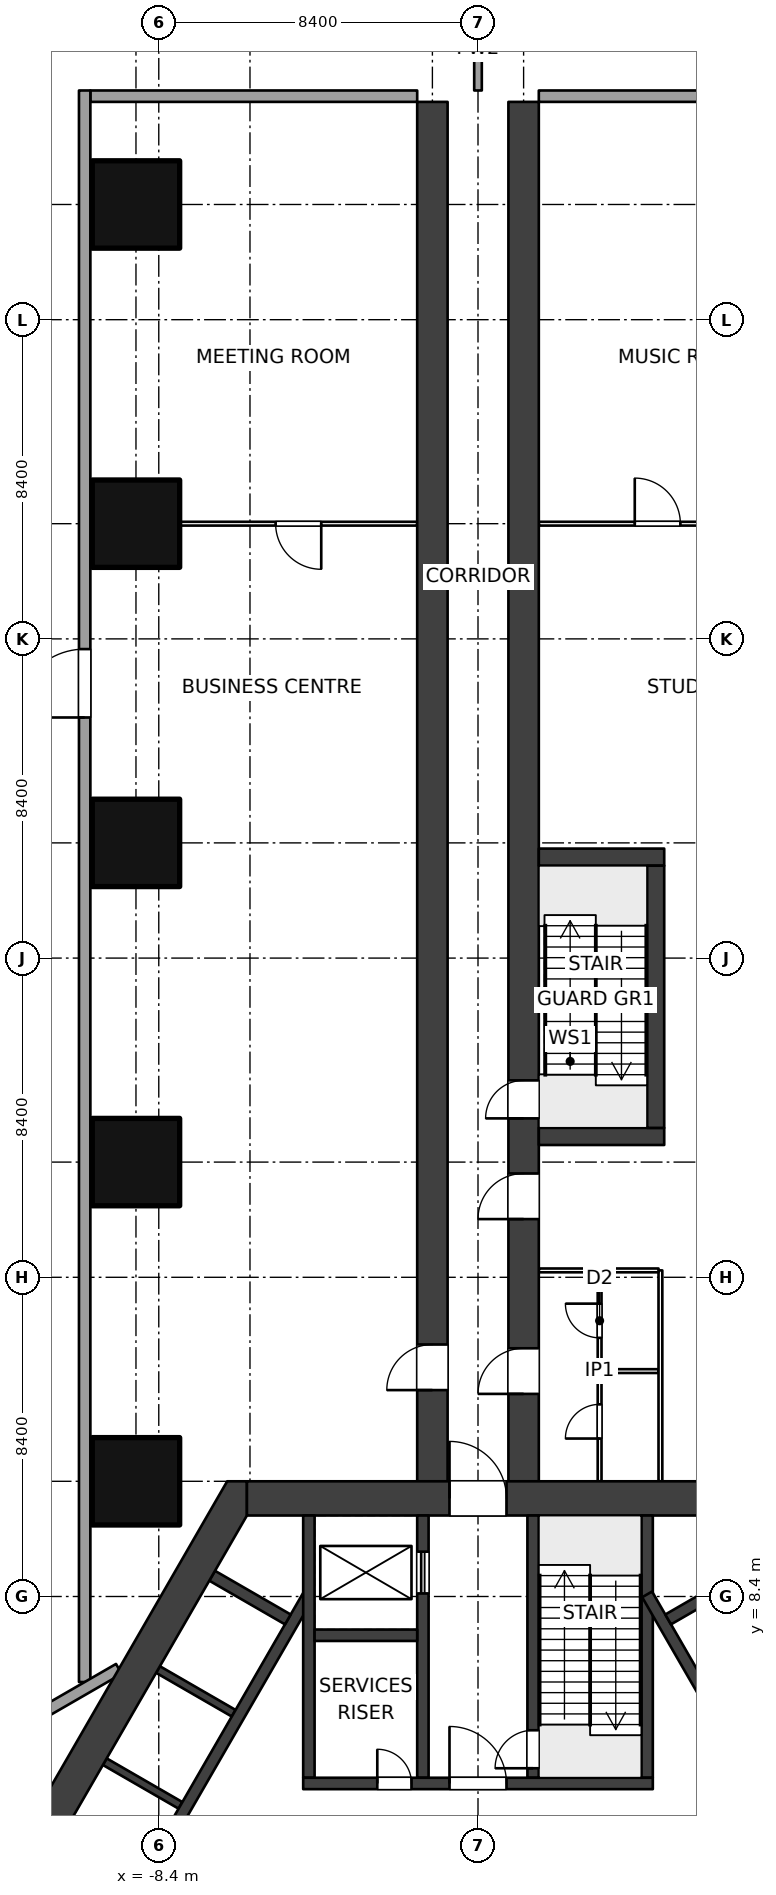
"""IFC4 building model, lengths in metres.
Left out: names, types, materials, properties, quantities, classifications, styles, units other than length and angle.
Written with IfcOpenShell. Run it as: python <this file> out.ifc"""

import sys

from ifc_helpers import new_model, si_unit, direction, frame, frame_2d, origin, origin_2d, place, context, subcontext, project, spatial, polyline, rectangle, outline, extrude, element, fill, save


model = new_model("IFC4")
c1 = context("Model", 3, precision=1e-05, world=origin(), true_north=direction((0.0, 1.0)))
c2 = subcontext(c1, "Body", "Model", "MODEL_VIEW")
j1 = project(units=[si_unit("LENGTHUNIT", "METRE"), si_unit("PLANEANGLEUNIT", "RADIAN")], contexts=[c1])
p1 = place(None, origin())
s1 = spatial("IfcSite", under=j1, at=p1, CompositionType="ELEMENT")
p2 = place(p1, origin())
s2 = spatial("IfcBuilding", under=s1, at=p2, CompositionType="ELEMENT")
p3 = place(p2, frame((0.0, 0.0, 16.0)))
s3 = spatial("IfcBuildingStorey", under=s2, at=p3, CompositionType="ELEMENT", Elevation=16.0)
for number, where, z_axis, x_axis in (
    (1, (-9.0, 11.432, 0.0), (0.0, 0.0, 1.0), (1.0, 0.0, 0.0)),
    (2, (-9.0, 19.832, 0.0), (0.0, 0.0, 1.0), (1.0, 0.0, 0.0)),
    (3, (-9.0, 28.231, 0.0), (0.0, 0.0, 1.0), (1.0, 0.0, 0.0)),
    (4, (-9.0, 36.632, 0.0), (0.0, 0.0, 1.0), (1.0, 0.0, 0.0)),
    (5, (-9.0, 45.031, 0.0), (0.0, 0.0, 1.0), (1.0, 0.0, 0.0)),
):
    element("IfcColumn", number, at=place(p3, frame(where, z_axis=z_axis, x_axis=x_axis)), inside=s3, PredefinedType="COLUMN", context=c2, shape_type="SweptSolid", body=[
        extrude(rectangle(XDim=2.3, YDim=2.3, at=origin_2d()), origin(), (0.0, 0.0, 1.0), 5.0),
    ])
p4 = place(p3, frame((-6.08, 10.981, 0.0), z_axis=(0.0, 0.0, 1.0), x_axis=(1.0, 0.0, 0.0)))
e6 = element("IfcWall", 6, at=p4, inside=s3, PredefinedType="SHEAR", context=c2, shape_type="SweptSolid", body=[
    extrude(rectangle(XDim=12.161, YDim=0.9, at=frame_2d((6.08, 0.0))), origin(), (0.0, 0.0, 1.0), 5.0),
])
p5 = place(p4, frame((5.33, 0.0, 0.0)))
e7 = element("IfcOpeningElement", 7, at=p5, cuts=e6, PredefinedType="OPENING", context=c2, shape_type="SweptSolid", body=[
    extrude(rectangle(XDim=1.5, YDim=2.1, at=frame_2d((0.75, 1.05))), frame((0.0, 0.46, 0.0), z_axis=(0.0, -1.0, 0.0), x_axis=(1.0, 0.0, 0.0)), (0.0, 0.0, 1.0), 0.92),
])
p6 = place(p3, origin())
e8 = element("IfcWall", 8, at=p6, inside=s3, PredefinedType="SHEAR", context=c2, shape_type="SweptSolid", body=[
    extrude(outline(polyline([(-6.6, 11.432), (-13.2, 0.0), (-12.94, -0.45), (-12.161, 0.0), (-6.08, 10.531), (-6.08, 11.432), (-6.6, 11.432)])), origin(), (0.0, 0.0, 1.0), 5.0),
])
p7 = place(p3, frame((-4.6, 3.48, 0.0), z_axis=(0.0, 0.0, 1.0), x_axis=(1.0, 0.0, 0.0)))
e9 = element("IfcWall", 9, at=p7, inside=s3, PredefinedType="SHEAR", context=c2, shape_type="SweptSolid", body=[
    extrude(rectangle(XDim=9.2, YDim=0.3, at=frame_2d((4.6, 0.0))), origin(), (0.0, 0.0, 1.0), 5.0),
])
p8 = place(p7, frame((3.85, 0.0, 0.0)))
e10 = element("IfcOpeningElement", 10, at=p8, cuts=e9, PredefinedType="OPENING", context=c2, shape_type="SweptSolid", body=[
    extrude(rectangle(XDim=1.5, YDim=2.1, at=frame_2d((0.75, 1.05))), frame((0.0, 0.16, 0.0), z_axis=(0.0, -1.0, 0.0), x_axis=(1.0, 0.0, 0.0)), (0.0, 0.0, 1.0), 0.32),
])
p9 = place(p7, frame((1.95, 0.0, 0.0)))
e11 = element("IfcOpeningElement", 11, at=p9, cuts=e9, PredefinedType="OPENING", context=c2, shape_type="SweptSolid", body=[
    extrude(rectangle(XDim=0.9, YDim=2.1, at=frame_2d((0.45, 1.05))), frame((0.0, 0.16, 0.0), z_axis=(0.0, -1.0, 0.0), x_axis=(1.0, 0.0, 0.0)), (0.0, 0.0, 1.0), 0.32),
])
p10 = place(p3, frame((1.45, 3.63, 0.0), z_axis=(0.0, 0.0, 1.0), x_axis=(0.0, 1.0, 0.0)))
e12 = element("IfcWall", 12, at=p10, inside=s3, PredefinedType="SHEAR", context=c2, shape_type="SweptSolid", body=[
    extrude(rectangle(XDim=6.902, YDim=0.3, at=frame_2d((3.451, 0.0))), origin(), (0.0, 0.0, 1.0), 5.0),
])
p11 = place(p10, frame((0.25, 0.0, 0.0)))
e13 = element("IfcOpeningElement", 13, at=p11, cuts=e12, PredefinedType="OPENING", context=c2, shape_type="SweptSolid", body=[
    extrude(rectangle(XDim=1.0, YDim=2.1, at=frame_2d((0.5, 1.05))), frame((0.0, 0.16, 0.0), z_axis=(0.0, -1.0, 0.0), x_axis=(1.0, 0.0, 0.0)), (0.0, 0.0, 1.0), 0.32),
])
p12 = place(p3, frame((4.45, 3.63, 0.0), z_axis=(0.0, 0.0, 1.0), x_axis=(0.0, 1.0, 0.0)))
e14 = element("IfcWall", 14, at=p12, inside=s3, PredefinedType="SHEAR", context=c2, shape_type="SweptSolid", body=[
    extrude(rectangle(XDim=6.902, YDim=0.3, at=frame_2d((3.451, 0.0))), origin(), (0.0, 0.0, 1.0), 5.0),
])
p13 = place(p3, frame((-1.45, 3.63, 0.0), z_axis=(0.0, 0.0, 1.0), x_axis=(0.0, 1.0, 0.0)))
e15 = element("IfcWall", 15, at=p13, inside=s3, PredefinedType="SHEAR", context=c2, shape_type="SweptSolid", body=[
    extrude(rectangle(XDim=6.902, YDim=0.3, at=frame_2d((3.451, 0.0))), origin(), (0.0, 0.0, 1.0), 5.0),
])
p14 = place(p13, frame((4.85, 0.0, 0.0)))
e16 = element("IfcOpeningElement", 16, at=p14, cuts=e15, PredefinedType="OPENING", context=c2, shape_type="SweptSolid", body=[
    extrude(rectangle(XDim=1.1, YDim=2.1, at=frame_2d((0.55, 1.05))), frame((0.0, 0.16, 0.0), z_axis=(0.0, -1.0, 0.0), x_axis=(1.0, 0.0, 0.0)), (0.0, 0.0, 1.0), 0.32),
])
p15 = place(p3, frame((-4.45, 3.63, 0.0), z_axis=(0.0, 0.0, 1.0), x_axis=(0.0, 1.0, 0.0)))
e17 = element("IfcWall", 17, at=p15, inside=s3, PredefinedType="SHEAR", context=c2, shape_type="SweptSolid", body=[
    extrude(rectangle(XDim=6.902, YDim=0.3, at=frame_2d((3.451, 0.0))), origin(), (0.0, 0.0, 1.0), 5.0),
])
p16 = place(p3, frame((-4.3, 7.38, 0.0), z_axis=(0.0, 0.0, 1.0), x_axis=(1.0, 0.0, 0.0)))
e18 = element("IfcWall", 18, at=p16, inside=s3, PredefinedType="SHEAR", context=c2, shape_type="SweptSolid", body=[
    extrude(rectangle(XDim=2.7, YDim=0.3, at=frame_2d((1.35, 0.0))), origin(), (0.0, 0.0, 1.0), 5.0),
])
p17 = place(p3, frame((4.45, 8.455, 0.0), z_axis=(0.0, 0.0, 1.0), x_axis=(0.500002290144, -0.866024081565, 0.0)))
e19 = element("IfcWall", 19, at=p17, inside=s3, PredefinedType="SHEAR", context=c2, shape_type="SweptSolid", body=[
    extrude(rectangle(XDim=10.195, YDim=0.3, at=frame_2d((5.098, 0.0))), origin(), (0.0, 0.0, 1.0), 5.0),
])
p18 = place(p3, frame((5.004, 7.796, 0.0), z_axis=(0.0, 0.0, 1.0), x_axis=(0.866053019151, 0.499952165731, 0.0)))
e20 = element("IfcWall", 20, at=p18, inside=s3, PredefinedType="SHEAR", context=c2, shape_type="SweptSolid", body=[
    extrude(rectangle(XDim=2.3, YDim=0.3, at=frame_2d((1.15, 0.0))), origin(), (0.0, 0.0, 1.0), 5.0),
])
p19 = place(p3, frame((-9.548, -0.374, 0.0), z_axis=(0.0, 0.0, 1.0), x_axis=(0.500002290144, 0.866024081565, 0.0)))
e21 = element("IfcWall", 21, at=p19, inside=s3, PredefinedType="SHEAR", context=c2, shape_type="SweptSolid", body=[
    extrude(rectangle(XDim=10.195, YDim=0.3, at=frame_2d((5.098, 0.0))), origin(), (0.0, 0.0, 1.0), 5.0),
])
p20 = place(p3, frame((-5.004, 7.796, 0.0), z_axis=(0.0, 0.0, 1.0), x_axis=(-0.866053019151, 0.499952165731, 0.0)))
e22 = element("IfcWall", 22, at=p20, inside=s3, PredefinedType="SHEAR", context=c2, shape_type="SweptSolid", body=[
    extrude(rectangle(XDim=2.3, YDim=0.3, at=frame_2d((1.15, 0.0))), origin(), (0.0, 0.0, 1.0), 5.0),
])
for number, where, z_axis, x_axis in (
    (23, (-7.829, 2.903, 0.0), (0.0, 0.0, 1.0), (-0.866, 0.5, 0.0)),
    (24, (-6.429, 5.328, 0.0), (0.0, 0.0, 1.0), (-0.866, 0.5, 0.0)),
):
    element("IfcWall", number, at=place(p3, frame(where, z_axis=z_axis, x_axis=x_axis)), inside=s3, PredefinedType="SHEAR", context=c2, shape_type="SweptSolid", body=[
        extrude(rectangle(XDim=2.3, YDim=0.2, at=frame_2d((1.15, 0.0))), origin(), (0.0, 0.0, 1.0), 5.0),
    ])
p21 = place(p3, frame((-1.2, 10.981, 0.0), z_axis=(0.0, 0.0, 1.0), x_axis=(0.0, 1.0, 0.0)))
e25 = element("IfcWall", 25, at=p21, inside=s3, PredefinedType="SHEAR", context=c2, shape_type="SweptSolid", body=[
    extrude(rectangle(XDim=36.75, YDim=0.8, at=frame_2d((18.375, 0.0))), origin(), (0.0, 0.0, 1.0), 5.0),
])
p22 = place(p21, frame((2.85, 0.0, 0.0)))
e26 = element("IfcOpeningElement", 26, at=p22, cuts=e25, PredefinedType="OPENING", context=c2, shape_type="SweptSolid", body=[
    extrude(rectangle(XDim=1.2, YDim=2.1, at=frame_2d((0.6, 1.05))), frame((0.0, 0.41, 0.0), z_axis=(0.0, -1.0, 0.0), x_axis=(1.0, 0.0, 0.0)), (0.0, 0.0, 1.0), 0.82),
])
p23 = place(p3, frame((1.2, 10.981, 0.0), z_axis=(0.0, 0.0, 1.0), x_axis=(0.0, 1.0, 0.0)))
e27 = element("IfcWall", 27, at=p23, inside=s3, PredefinedType="SHEAR", context=c2, shape_type="SweptSolid", body=[
    extrude(rectangle(XDim=36.75, YDim=0.8, at=frame_2d((18.375, 0.0))), origin(), (0.0, 0.0, 1.0), 5.0),
])
p24 = place(p23, frame((10.0, 0.0, 0.0)))
e28 = element("IfcOpeningElement", 28, at=p24, cuts=e27, PredefinedType="OPENING", context=c2, shape_type="SweptSolid", body=[
    extrude(rectangle(XDim=1.0, YDim=2.1, at=frame_2d((0.5, 1.05))), frame((0.0, 0.41, 0.0), z_axis=(0.0, -1.0, 0.0), x_axis=(1.0, 0.0, 0.0)), (0.0, 0.0, 1.0), 0.82),
])
p25 = place(p23, frame((2.75, 0.0, 0.0)))
e29 = element("IfcOpeningElement", 29, at=p25, cuts=e27, PredefinedType="OPENING", context=c2, shape_type="SweptSolid", body=[
    extrude(rectangle(XDim=1.2, YDim=2.1, at=frame_2d((0.6, 1.05))), frame((0.0, 0.41, 0.0), z_axis=(0.0, -1.0, 0.0), x_axis=(1.0, 0.0, 0.0)), (0.0, 0.0, 1.0), 0.82),
])
p26 = place(p23, frame((7.35, 0.0, 0.0)))
e30 = element("IfcOpeningElement", 30, at=p26, cuts=e27, PredefinedType="OPENING", context=c2, shape_type="SweptSolid", body=[
    extrude(rectangle(XDim=1.2, YDim=2.1, at=frame_2d((0.6, 1.05))), frame((0.0, 0.41, 0.0), z_axis=(0.0, -1.0, 0.0), x_axis=(1.0, 0.0, 0.0)), (0.0, 0.0, 1.0), 0.82),
])
p27 = place(p3, frame((-1.6, 36.632, 0.0), z_axis=(0.0, 0.0, 1.0), x_axis=(-1.0, 0.0, 0.0)))
e31 = element("IfcWall", 31, at=p27, inside=s3, PredefinedType="PARTITIONING", context=c2, shape_type="SweptSolid", body=[
    extrude(rectangle(XDim=6.25, YDim=0.1, at=frame_2d((3.125, 0.0))), origin(), (0.0, 0.0, 1.0), 2.9),
])
p28 = place(p27, frame((2.525, 0.0, 0.0)))
e32 = element("IfcOpeningElement", 32, at=p28, cuts=e31, PredefinedType="OPENING", context=c2, shape_type="SweptSolid", body=[
    extrude(rectangle(XDim=1.2, YDim=2.1, at=frame_2d((0.6, 1.05))), frame((0.0, 0.06, 0.0), z_axis=(0.0, -1.0, 0.0), x_axis=(1.0, 0.0, 0.0)), (0.0, 0.0, 1.0), 0.12),
])
p29 = place(p3, frame((3.2, 11.432, 0.0), z_axis=(0.0, 0.0, 1.0), x_axis=(0.0, 1.0, 0.0)))
e33 = element("IfcWall", 33, at=p29, inside=s3, PredefinedType="PARTITIONING", context=c2, shape_type="SweptSolid", body=[
    extrude(rectangle(XDim=5.6, YDim=0.1, at=frame_2d((2.8, 0.0))), origin(), (0.0, 0.0, 1.0), 4.7),
])
p30 = place(p29, frame((1.125, 0.0, 0.0)))
e34 = element("IfcOpeningElement", 34, at=p30, cuts=e33, PredefinedType="OPENING", context=c2, shape_type="SweptSolid", body=[
    extrude(rectangle(XDim=0.9, YDim=2.1, at=frame_2d((0.45, 1.05))), frame((0.0, 0.06, 0.0), z_axis=(0.0, -1.0, 0.0), x_axis=(1.0, 0.0, 0.0)), (0.0, 0.0, 1.0), 0.12),
])
p31 = place(p29, frame((3.775, 0.0, 0.0)))
e35 = element("IfcOpeningElement", 35, at=p31, cuts=e33, PredefinedType="OPENING", context=c2, shape_type="SweptSolid", body=[
    extrude(rectangle(XDim=0.9, YDim=2.1, at=frame_2d((0.45, 1.05))), frame((0.0, 0.06, 0.0), z_axis=(0.0, -1.0, 0.0), x_axis=(1.0, 0.0, 0.0)), (0.0, 0.0, 1.0), 0.12),
])
p32 = place(p3, frame((3.25, 14.332, 0.0), z_axis=(0.0, 0.0, 1.0), x_axis=(1.0, 0.0, 0.0)))
e36 = element("IfcWall", 36, at=p32, inside=s3, PredefinedType="PARTITIONING", context=c2, shape_type="SweptSolid", body=[
    extrude(rectangle(XDim=1.5, YDim=0.1, at=frame_2d((0.75, 0.0))), origin(), (0.0, 0.0, 1.0), 4.7),
])
p33 = place(p3, frame((4.8, 11.432, 0.0), z_axis=(0.0, 0.0, 1.0), x_axis=(0.0, 1.0, 0.0)))
e37 = element("IfcWall", 37, at=p33, inside=s3, PredefinedType="PARTITIONING", context=c2, shape_type="SweptSolid", body=[
    extrude(rectangle(XDim=5.55, YDim=0.1, at=frame_2d((2.775, 0.0))), origin(), (0.0, 0.0, 1.0), 4.7),
])
p34 = place(p3, frame((1.6, 16.981, 0.0), z_axis=(0.0, 0.0, 1.0), x_axis=(1.0, 0.0, 0.0)))
e38 = element("IfcWall", 38, at=p34, inside=s3, PredefinedType="PARTITIONING", context=c2, shape_type="SweptSolid", body=[
    extrude(rectangle(XDim=3.15, YDim=0.1, at=frame_2d((1.575, 0.0))), origin(), (0.0, 0.0, 1.0), 4.7),
])
p35 = place(p3, frame((1.6, 36.632, 0.0), z_axis=(0.0, 0.0, 1.0), x_axis=(1.0, 0.0, 0.0)))
e39 = element("IfcWall", 39, at=p35, inside=s3, PredefinedType="PARTITIONING", context=c2, shape_type="SweptSolid", body=[
    extrude(rectangle(XDim=6.25, YDim=0.1, at=frame_2d((3.125, 0.0))), origin(), (0.0, 0.0, 1.0), 2.9),
])
p36 = place(p35, frame((2.525, 0.0, 0.0)))
e40 = element("IfcOpeningElement", 40, at=p36, cuts=e39, PredefinedType="OPENING", context=c2, shape_type="SweptSolid", body=[
    extrude(rectangle(XDim=1.2, YDim=2.1, at=frame_2d((0.6, 1.05))), frame((0.0, 0.06, 0.0), z_axis=(0.0, -1.0, 0.0), x_axis=(1.0, 0.0, 0.0)), (0.0, 0.0, 1.0), 0.12),
])
p37 = place(p3, frame((0.0, 48.031, 0.0), z_axis=(0.0, 0.0, 1.0), x_axis=(0.0, 1.0, 0.0)))
e41 = element("IfcWall", 41, at=p37, inside=s3, PredefinedType="SOLIDWALL", context=c2, shape_type="SweptSolid", body=[
    extrude(rectangle(XDim=2.176, YDim=0.2, at=frame_2d((1.088, 0.0))), origin(), (0.0, 0.0, 1.0), 4.7),
])
for number, where, z_axis, x_axis in (
    (42, (-1.6, 47.882, 0.0), (0.0, 0.0, 1.0), (-1.0, 0.0, 0.0)),
    (43, (1.6, 47.882, 0.0), (0.0, 0.0, 1.0), (1.0, 0.0, 0.0)),
):
    element("IfcWall", number, at=place(p3, frame(where, z_axis=z_axis, x_axis=x_axis)), inside=s3, PredefinedType="SOLIDWALL", context=c2, shape_type="SweptSolid", body=[
        extrude(rectangle(XDim=8.6, YDim=0.3, at=frame_2d((4.3, 0.0))), origin(), (0.0, 0.0, 1.0), 3.1),
    ])
p38 = place(p3, frame((-10.35, 6.149, 0.0), z_axis=(0.0, 0.0, 1.0), x_axis=(0.0, 1.0, 0.0)))
e44 = element("IfcWall", 44, at=p38, inside=s3, PredefinedType="SOLIDWALL", context=c2, shape_type="SweptSolid", body=[
    extrude(rectangle(XDim=41.883, YDim=0.3, at=frame_2d((20.941, 0.0))), origin(), (0.0, 0.0, 1.0), 4.7),
])
p39 = place(p38, frame((25.383, 0.0, 0.0)))
e45 = element("IfcOpeningElement", 45, at=p39, cuts=e44, PredefinedType="OPENING", context=c2, shape_type="SweptSolid", body=[
    extrude(rectangle(XDim=1.8, YDim=2.4, at=frame_2d((0.9, 1.2))), frame((0.0, 0.16, 0.0), z_axis=(0.0, -1.0, 0.0), x_axis=(1.0, 0.0, 0.0)), (0.0, 0.0, 1.0), 0.32),
])
p40 = place(p3, frame((-9.45, 6.495, 0.0), z_axis=(0.0, 0.0, 1.0), x_axis=(-0.866025301493, -0.500000177174, 0.0)))
e46 = element("IfcWall", 46, at=p40, inside=s3, PredefinedType="SOLIDWALL", context=c2, shape_type="SweptSolid", body=[
    extrude(rectangle(XDim=43.095, YDim=0.3, at=frame_2d((21.548, 0.0))), origin(), (0.0, 0.0, 1.0), 4.7),
])
p41 = place(p40, frame((26.595, 0.0, 0.0)))
e47 = element("IfcOpeningElement", 47, at=p41, cuts=e46, PredefinedType="OPENING", context=c2, shape_type="SweptSolid", body=[
    extrude(rectangle(XDim=1.8, YDim=2.4, at=frame_2d((0.9, 1.2))), frame((0.0, 0.16, 0.0), z_axis=(0.0, -1.0, 0.0), x_axis=(1.0, 0.0, 0.0)), (0.0, 0.0, 1.0), 0.32),
])
for number, where, z_axis, x_axis in (
    (48, (1.6, 20.507, 0.0), (0.0, 0.0, 1.0), (1.0, 0.0, 0.0)),
    (49, (1.6, 27.856, 0.0), (0.0, 0.0, 1.0), (1.0, 0.0, 0.0)),
):
    element("IfcWall", number, at=place(p3, frame(where, z_axis=z_axis, x_axis=x_axis)), inside=s3, PredefinedType="SOLIDWALL", context=c2, shape_type="SweptSolid", body=[
        extrude(rectangle(XDim=3.3, YDim=0.45, at=frame_2d((1.65, 0.0))), origin(), (0.0, 0.0, 1.0), 5.0),
    ])
p42 = place(p3, frame((4.675, 20.731, 0.0), z_axis=(0.0, 0.0, 1.0), x_axis=(0.0, 1.0, 0.0)))
e50 = element("IfcWall", 50, at=p42, inside=s3, PredefinedType="SOLIDWALL", context=c2, shape_type="SweptSolid", body=[
    extrude(rectangle(XDim=6.9, YDim=0.45, at=frame_2d((3.45, 0.0))), origin(), (0.0, 0.0, 1.0), 5.0),
])
p43 = place(p14, origin())
e51 = element("IfcDoor", 51, at=p43, inside=s3, OperationType="DOUBLE_DOOR_SLIDING", PredefinedType="DOOR", context=c2, shape_type="SweptSolid", body=[
    extrude(rectangle(XDim=1.1, YDim=2.1, at=frame_2d((0.55, 1.05))), frame((0.0, 0.025, 0.0), z_axis=(0.0, -1.0, 0.0), x_axis=(1.0, 0.0, 0.0)), (0.0, 0.0, 1.0), 0.05),
])
fill(e16, e51)
p44 = place(p8, origin())
e52 = element("IfcDoor", 52, at=p44, inside=s3, OperationType="DOUBLE_DOOR_DOUBLE_SWING", PredefinedType="DOOR", context=c2, shape_type="SweptSolid", body=[
    extrude(rectangle(XDim=1.5, YDim=2.1, at=frame_2d((0.75, 1.05))), frame((0.0, 0.025, 0.0), z_axis=(0.0, -1.0, 0.0), x_axis=(1.0, 0.0, 0.0)), (0.0, 0.0, 1.0), 0.05),
])
fill(e10, e52)
p45 = place(p9, origin())
e53 = element("IfcDoor", 53, at=p45, inside=s3, OperationType="SINGLE_SWING_LEFT", PredefinedType="DOOR", context=c2, shape_type="SweptSolid", body=[
    extrude(rectangle(XDim=0.9, YDim=2.1, at=frame_2d((0.45, 1.05))), frame((0.0, 0.025, 0.0), z_axis=(0.0, -1.0, 0.0), x_axis=(1.0, 0.0, 0.0)), (0.0, 0.0, 1.0), 0.05),
])
fill(e11, e53)
p46 = place(p11, origin())
e54 = element("IfcDoor", 54, at=p46, inside=s3, OperationType="SINGLE_SWING_LEFT", PredefinedType="DOOR", context=c2, shape_type="SweptSolid", body=[
    extrude(rectangle(XDim=1.0, YDim=2.1, at=frame_2d((0.5, 1.05))), frame((0.0, 0.025, 0.0), z_axis=(0.0, -1.0, 0.0), x_axis=(1.0, 0.0, 0.0)), (0.0, 0.0, 1.0), 0.05),
])
fill(e13, e54)
p47 = place(p5, origin())
e55 = element("IfcDoor", 55, at=p47, inside=s3, OperationType="DOUBLE_DOOR_DOUBLE_SWING", PredefinedType="DOOR", context=c2, shape_type="SweptSolid", body=[
    extrude(rectangle(XDim=1.5, YDim=2.1, at=frame_2d((0.75, 1.05))), frame((0.0, 0.025, 0.0), z_axis=(0.0, -1.0, 0.0), x_axis=(1.0, 0.0, 0.0)), (0.0, 0.0, 1.0), 0.05),
])
fill(e7, e55)
p48 = place(p24, origin())
e56 = element("IfcDoor", 56, at=p48, inside=s3, OperationType="SINGLE_SWING_LEFT", PredefinedType="DOOR", context=c2, shape_type="SweptSolid", body=[
    extrude(rectangle(XDim=1.0, YDim=2.1, at=frame_2d((0.5, 1.05))), frame((0.0, 0.025, 0.0), z_axis=(0.0, -1.0, 0.0), x_axis=(1.0, 0.0, 0.0)), (0.0, 0.0, 1.0), 0.05),
])
fill(e28, e56)
p49 = place(p28, origin())
e57 = element("IfcDoor", 57, at=p49, inside=s3, OperationType="DOUBLE_SWING_LEFT", PredefinedType="DOOR", context=c2, shape_type="SweptSolid", body=[
    extrude(rectangle(XDim=1.2, YDim=2.1, at=frame_2d((0.6, 1.05))), frame((0.0, 0.025, 0.0), z_axis=(0.0, -1.0, 0.0), x_axis=(1.0, 0.0, 0.0)), (0.0, 0.0, 1.0), 0.05),
])
fill(e32, e57)
p50 = place(p22, origin())
e58 = element("IfcDoor", 58, at=p50, inside=s3, OperationType="DOUBLE_SWING_LEFT", PredefinedType="DOOR", context=c2, shape_type="SweptSolid", body=[
    extrude(rectangle(XDim=1.2, YDim=2.1, at=frame_2d((0.6, 1.05))), frame((0.0, 0.025, 0.0), z_axis=(0.0, -1.0, 0.0), x_axis=(1.0, 0.0, 0.0)), (0.0, 0.0, 1.0), 0.05),
])
fill(e26, e58)
p51 = place(p30, origin())
e59 = element("IfcDoor", 59, at=p51, inside=s3, OperationType="SINGLE_SWING_LEFT", PredefinedType="DOOR", context=c2, shape_type="SweptSolid", body=[
    extrude(rectangle(XDim=0.9, YDim=2.1, at=frame_2d((0.45, 1.05))), frame((0.0, 0.025, 0.0), z_axis=(0.0, -1.0, 0.0), x_axis=(1.0, 0.0, 0.0)), (0.0, 0.0, 1.0), 0.05),
])
fill(e34, e59)
p52 = place(p31, origin())
e60 = element("IfcDoor", 60, at=p52, inside=s3, OperationType="SINGLE_SWING_RIGHT", PredefinedType="DOOR", context=c2, shape_type="SweptSolid", body=[
    extrude(rectangle(XDim=0.9, YDim=2.1, at=frame_2d((0.45, 1.05))), frame((0.0, 0.025, 0.0), z_axis=(0.0, -1.0, 0.0), x_axis=(1.0, 0.0, 0.0)), (0.0, 0.0, 1.0), 0.05),
])
fill(e35, e60)
p53 = place(p25, origin())
e61 = element("IfcDoor", 61, at=p53, inside=s3, OperationType="DOUBLE_SWING_LEFT", PredefinedType="DOOR", context=c2, shape_type="SweptSolid", body=[
    extrude(rectangle(XDim=1.2, YDim=2.1, at=frame_2d((0.6, 1.05))), frame((0.0, 0.025, 0.0), z_axis=(0.0, -1.0, 0.0), x_axis=(1.0, 0.0, 0.0)), (0.0, 0.0, 1.0), 0.05),
])
fill(e29, e61)
p54 = place(p36, origin())
e62 = element("IfcDoor", 62, at=p54, inside=s3, OperationType="DOUBLE_SWING_LEFT", PredefinedType="DOOR", context=c2, shape_type="SweptSolid", body=[
    extrude(rectangle(XDim=1.2, YDim=2.1, at=frame_2d((0.6, 1.05))), frame((0.0, 0.025, 0.0), z_axis=(0.0, -1.0, 0.0), x_axis=(1.0, 0.0, 0.0)), (0.0, 0.0, 1.0), 0.05),
])
fill(e40, e62)
p55 = place(p26, origin())
e63 = element("IfcDoor", 63, at=p55, inside=s3, OperationType="DOUBLE_SWING_LEFT", PredefinedType="DOOR", context=c2, shape_type="SweptSolid", body=[
    extrude(rectangle(XDim=1.2, YDim=2.1, at=frame_2d((0.6, 1.05))), frame((0.0, 0.025, 0.0), z_axis=(0.0, -1.0, 0.0), x_axis=(1.0, 0.0, 0.0)), (0.0, 0.0, 1.0), 0.05),
])
fill(e30, e63)
p56 = place(p39, origin())
e64 = element("IfcDoor", 64, at=p56, inside=s3, OperationType="DOUBLE_DOOR_DOUBLE_SWING", PredefinedType="DOOR", context=c2, shape_type="SweptSolid", body=[
    extrude(rectangle(XDim=1.8, YDim=2.4, at=frame_2d((0.9, 1.2))), frame((0.0, 0.025, 0.0), z_axis=(0.0, -1.0, 0.0), x_axis=(1.0, 0.0, 0.0)), (0.0, 0.0, 1.0), 0.05),
])
fill(e45, e64)
save(model, sys.argv[1])
